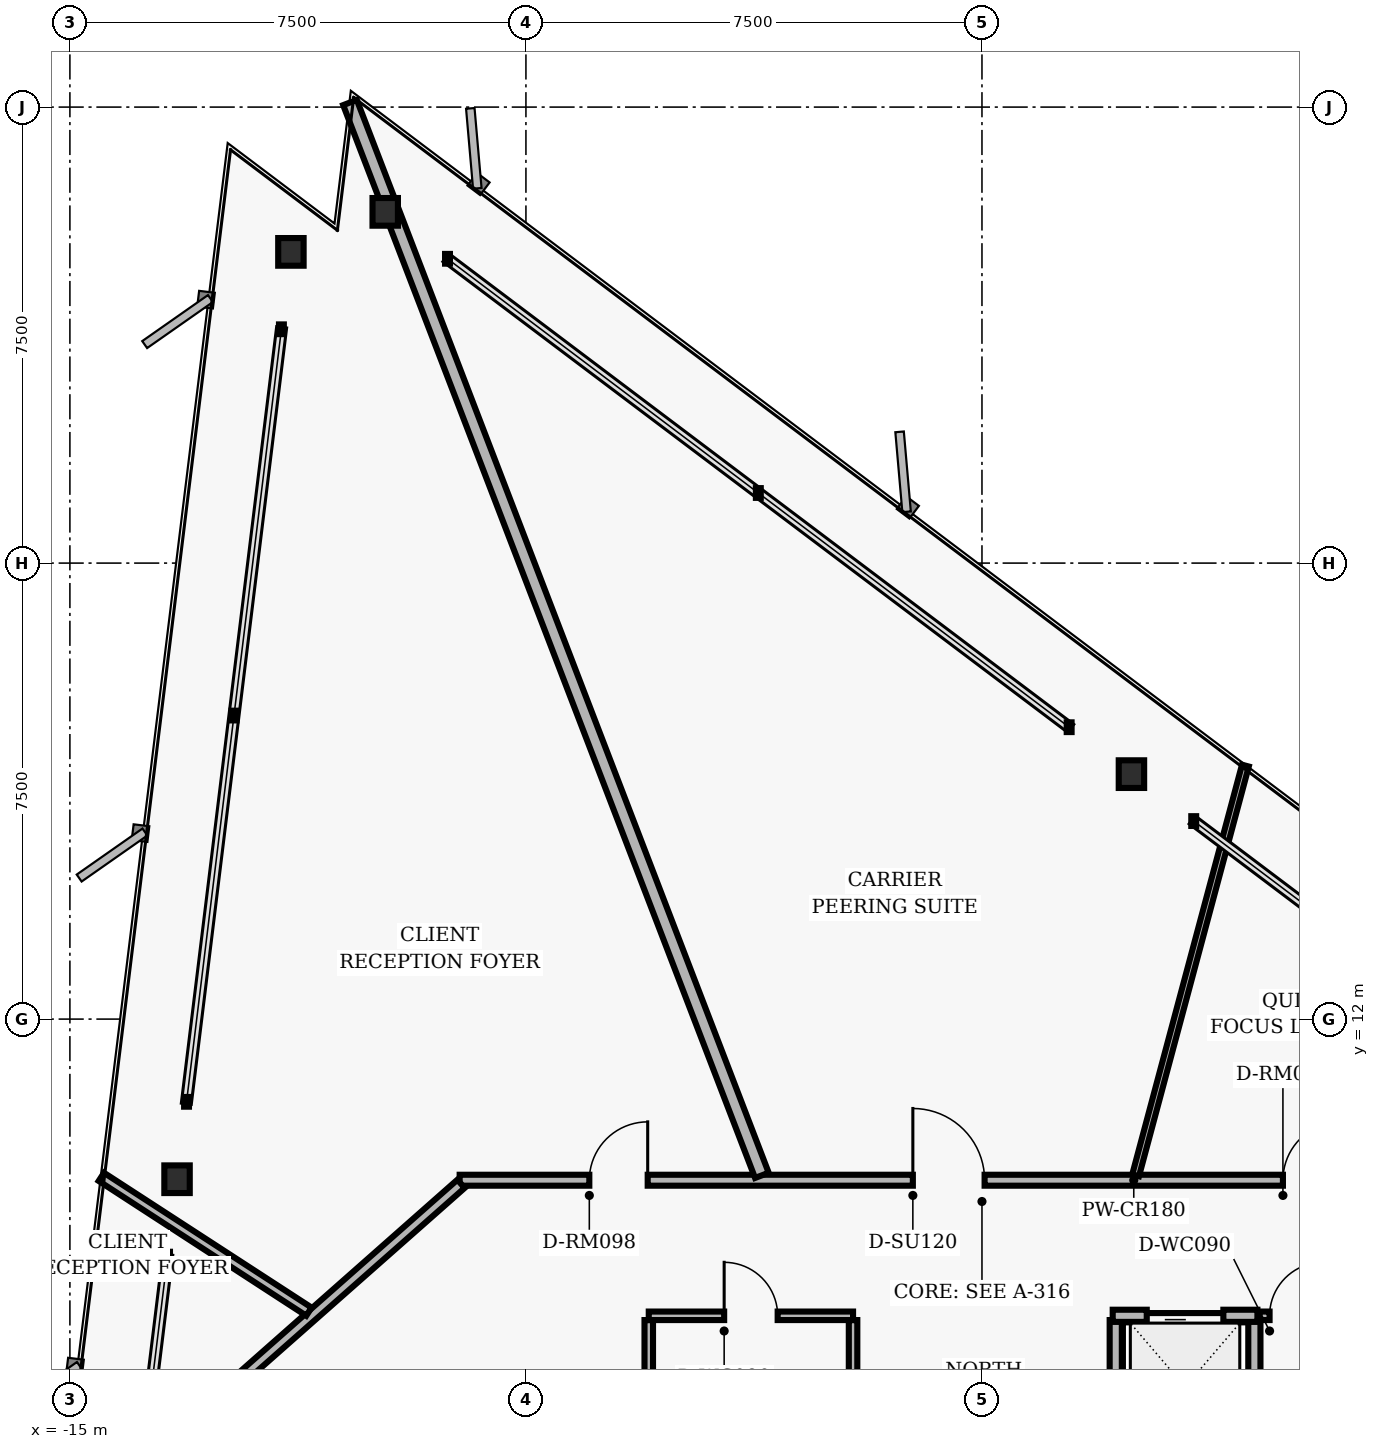
"""IFC4 building model, lengths in metres.
Left out: names, types, materials, properties, quantities, classifications, styles, units other than length and angle.
Written with IfcOpenShell. Run it as: python <this file> out.ifc"""

import sys

from ifc_helpers import new_model, si_unit, direction, frame, frame_2d, origin, origin_2d, place, context, subcontext, project, spatial, rectangle, i_section, extrude, element, fill, save


model = new_model("IFC4")
c1 = context("Model", 3, precision=1e-05, world=origin(), true_north=direction((0.0, 1.0)))
c2 = subcontext(c1, "Body", "Model", "MODEL_VIEW")
j1 = project(units=[si_unit("LENGTHUNIT", "METRE"), si_unit("PLANEANGLEUNIT", "RADIAN")], contexts=[c1])
p1 = place(None, origin())
s1 = spatial("IfcSite", under=j1, at=p1, CompositionType="ELEMENT")
p2 = place(p1, origin())
s2 = spatial("IfcBuilding", under=s1, at=p2, CompositionType="ELEMENT")
p3 = place(p2, frame((0.0, 0.0, 66.4)))
s3 = spatial("IfcBuildingStorey", under=s2, at=p3, CompositionType="ELEMENT", Elevation=66.4)
for number, where, z_axis, x_axis in (
    (1, (2.458, 16.029, 0.0), (0.0, 0.0, 1.0), (1.0, 0.0, 0.0)),
    (2, (-9.814, 25.277, 0.0), (0.0, 0.0, 1.0), (1.0, 0.0, 0.0)),
    (3, (-11.365, 24.619, 0.0), (0.0, 0.0, 1.0), (1.0, 0.0, 0.0)),
    (4, (-13.238, 9.366, 0.0), (0.0, 0.0, 1.0), (1.0, 0.0, 0.0)),
):
    element("IfcColumn", number, at=place(p3, frame(where, z_axis=z_axis, x_axis=x_axis)), inside=s3, PredefinedType="COLUMN", context=c2, shape_type="SweptSolid", body=[
        extrude(i_section(OverallWidth=0.418, OverallDepth=0.455, WebThickness=0.042, FlangeThickness=0.068, FilletRadius=0.025, at=origin_2d()), origin(), (0.0, 0.0, 1.0), 3.36),
    ])
for number, where, z_axis, x_axis in (
    (5, (2.2, 4.95, 0.0), (0.0, 0.0, 1.0), (0.0, 1.0, 0.0)),
    (6, (4.48, 4.95, 0.0), (0.0, 0.0, 1.0), (0.0, 1.0, 0.0)),
):
    element("IfcWall", number, at=place(p3, frame(where, z_axis=z_axis, x_axis=x_axis)), inside=s3, PredefinedType="PARTITIONING", context=c2, shape_type="SweptSolid", body=[
        extrude(rectangle(XDim=2.1, YDim=0.2, at=frame_2d((1.05, 0.0))), origin(), (0.0, 0.0, 1.0), 3.073),
    ])
p4 = place(p3, frame((2.15, 7.12, 0.0), z_axis=(0.0, 0.0, 1.0), x_axis=(1.0, 0.0, 0.0)))
e7 = element("IfcWall", 7, at=p4, inside=s3, PredefinedType="PARTITIONING", context=c2, shape_type="SweptSolid", body=[
    extrude(rectangle(XDim=2.38, YDim=0.2, at=frame_2d((1.19, 0.0))), origin(), (0.0, 0.0, 1.0), 2.587),
])
p5 = place(p4, frame((0.56, 0.0, 0.0)))
e8 = element("IfcOpeningElement", 8, at=p5, cuts=e7, PredefinedType="OPENING", context=c2, shape_type="SweptSolid", body=[
    extrude(rectangle(XDim=1.26, YDim=2.06, at=frame_2d((0.63, 1.03))), frame((0.0, 0.11, 0.0), z_axis=(0.0, -1.0, 0.0), x_axis=(1.0, 0.0, 0.0)), (0.0, 0.0, 1.0), 0.22),
])
for number, where, z_axis, x_axis in (
    (9, (-5.48, 4.95, 0.0), (0.0, 0.0, 1.0), (0.0, 1.0, 0.0)),
    (10, (-2.12, 4.95, 0.0), (0.0, 0.0, 1.0), (0.0, 1.0, 0.0)),
):
    element("IfcWall", number, at=place(p3, frame(where, z_axis=z_axis, x_axis=x_axis)), inside=s3, PredefinedType="PARTITIONING", context=c2, shape_type="SweptSolid", body=[
        extrude(rectangle(XDim=2.1, YDim=0.14, at=frame_2d((1.05, 0.0))), origin(), (0.0, 0.0, 1.0), 3.073),
    ])
p6 = place(p3, frame((-5.48, 7.12, 0.0), z_axis=(0.0, 0.0, 1.0), x_axis=(1.0, 0.0, 0.0)))
e11 = element("IfcWall", 11, at=p6, inside=s3, PredefinedType="PARTITIONING", context=c2, shape_type="SweptSolid", body=[
    extrude(rectangle(XDim=3.36, YDim=0.14, at=frame_2d((1.68, 0.0))), origin(), (0.0, 0.0, 1.0), 3.073),
])
p7 = place(p6, frame((1.24, 0.0, 0.0)))
e12 = element("IfcOpeningElement", 12, at=p7, cuts=e11, PredefinedType="OPENING", context=c2, shape_type="SweptSolid", body=[
    extrude(rectangle(XDim=0.88, YDim=2.02, at=frame_2d((0.44, 1.01))), frame((0.0, 0.08, 0.0), z_axis=(0.0, -1.0, 0.0), x_axis=(1.0, 0.0, 0.0)), (0.0, 0.0, 1.0), 0.16),
])
p8 = place(p3, frame((4.56, 7.12, 0.0), z_axis=(0.0, 0.0, 1.0), x_axis=(1.0, 0.0, 0.0)))
e13 = element("IfcWall", 13, at=p8, inside=s3, PredefinedType="PARTITIONING", context=c2, shape_type="SweptSolid", body=[
    extrude(rectangle(XDim=1.22, YDim=0.14, at=frame_2d((0.61, 0.0))), origin(), (0.0, 0.0, 1.0), 2.587),
])
p9 = place(p8, frame((0.17, 0.0, 0.0)))
e14 = element("IfcOpeningElement", 14, at=p9, cuts=e13, PredefinedType="OPENING", context=c2, shape_type="SweptSolid", body=[
    extrude(rectangle(XDim=0.88, YDim=2.02, at=frame_2d((0.44, 1.01))), frame((0.0, 0.08, 0.0), z_axis=(0.0, -1.0, 0.0), x_axis=(1.0, 0.0, 0.0)), (0.0, 0.0, 1.0), 0.16),
])
p10 = place(p3, frame((-8.59, 9.35, 0.0), z_axis=(0.0, 0.0, 1.0), x_axis=(1.0, 0.0, 0.0)))
e15 = element("IfcWall", 15, at=p10, inside=s3, PredefinedType="PARTITIONING", context=c2, shape_type="SweptSolid", body=[
    extrude(rectangle(XDim=17.18, YDim=0.18, at=frame_2d((8.59, 0.0))), origin(), (0.0, 0.0, 1.0), 3.073),
])
p11 = place(p10, frame((13.54, 0.0, 0.0)))
e16 = element("IfcOpeningElement", 16, at=p11, cuts=e15, PredefinedType="OPENING", context=c2, shape_type="SweptSolid", body=[
    extrude(rectangle(XDim=0.96, YDim=2.02, at=frame_2d((0.48, 1.01))), frame((0.0, 0.1, 0.0), z_axis=(0.0, -1.0, 0.0), x_axis=(1.0, 0.0, 0.0)), (0.0, 0.0, 1.0), 0.2),
])
p12 = place(p10, frame((7.453, 0.0, 0.0)))
e17 = element("IfcOpeningElement", 17, at=p12, cuts=e15, PredefinedType="OPENING", context=c2, shape_type="SweptSolid", body=[
    extrude(rectangle(XDim=1.18, YDim=2.02, at=frame_2d((0.59, 1.01))), frame((0.0, 0.1, 0.0), z_axis=(0.0, -1.0, 0.0), x_axis=(1.0, 0.0, 0.0)), (0.0, 0.0, 1.0), 0.2),
])
p13 = place(p10, frame((2.133, 0.0, 0.0)))
e18 = element("IfcOpeningElement", 18, at=p13, cuts=e15, PredefinedType="OPENING", context=c2, shape_type="SweptSolid", body=[
    extrude(rectangle(XDim=0.96, YDim=2.02, at=frame_2d((0.48, 1.01))), frame((0.0, 0.1, 0.0), z_axis=(0.0, -1.0, 0.0), x_axis=(1.0, 0.0, 0.0)), (0.0, 0.0, 1.0), 0.2),
])
p14 = place(p3, frame((-13.268, 5.14, 0.0), z_axis=(0.0, 0.0, 1.0), x_axis=(0.749626463267, 0.66186113768, 0.0)))
e19 = element("IfcWall", 19, at=p14, inside=s3, PredefinedType="PARTITIONING", context=c2, shape_type="SweptSolid", body=[
    extrude(rectangle(XDim=6.27, YDim=0.18, at=frame_2d((3.135, 0.0))), origin(), (0.0, 0.0, 1.0), 3.073),
])
p15 = place(p3, frame((2.527, 9.43, 0.0), z_axis=(0.0, 0.0, 1.0), x_axis=(0.258803716415, 0.965929933468, 0.0)))
e20 = element("IfcWall", 20, at=p15, inside=s3, PredefinedType="MOVABLE", context=c2, shape_type="SweptSolid", body=[
    extrude(rectangle(XDim=6.977, YDim=0.115, at=frame_2d((3.489, 0.0))), origin(), (0.0, 0.0, 1.0), 3.073),
])
p16 = place(p3, frame((-3.62, 9.43, 0.0), z_axis=(0.0, 0.0, 1.0), x_axis=(-0.358366182081, 0.933581104961, 0.0)))
e21 = element("IfcWall", 21, at=p16, inside=s3, PredefinedType="PARTITIONING", context=c2, shape_type="SweptSolid", body=[
    extrude(rectangle(XDim=18.901, YDim=0.24, at=frame_2d((9.45, 0.0))), origin(), (0.0, 0.0, 1.0), 3.073),
])
p17 = place(p3, frame((-11.069, 7.188, 0.0), z_axis=(0.0, 0.0, 1.0), x_axis=(-0.838653238926, 0.544665718436, 0.0)))
e22 = element("IfcWall", 22, at=p17, inside=s3, PredefinedType="PARTITIONING", context=c2, shape_type="SweptSolid", body=[
    extrude(rectangle(XDim=4.07, YDim=0.16, at=frame_2d((2.035, 0.0))), origin(), (0.0, 0.0, 1.0), 2.358),
])
p18 = place(p5, origin())
e23 = element("IfcDoor", 23, at=p18, inside=s3, OperationType="SLIDING_TO_LEFT", PredefinedType="DOOR", context=c2, shape_type="SweptSolid", body=[
    extrude(rectangle(XDim=1.26, YDim=2.06, at=frame_2d((0.63, 1.03))), frame((0.0, 0.025, 0.0), z_axis=(0.0, -1.0, 0.0), x_axis=(1.0, 0.0, 0.0)), (0.0, 0.0, 1.0), 0.05),
])
fill(e8, e23)
p19 = place(p7, origin())
e24 = element("IfcDoor", 24, at=p19, inside=s3, OperationType="SINGLE_SWING_LEFT", PredefinedType="DOOR", context=c2, shape_type="SweptSolid", body=[
    extrude(rectangle(XDim=0.88, YDim=2.02, at=frame_2d((0.44, 1.01))), frame((0.0, 0.025, 0.0), z_axis=(0.0, -1.0, 0.0), x_axis=(1.0, 0.0, 0.0)), (0.0, 0.0, 1.0), 0.05),
])
fill(e12, e24)
p20 = place(p9, origin())
e25 = element("IfcDoor", 25, at=p20, inside=s3, OperationType="SINGLE_SWING_RIGHT", PredefinedType="DOOR", context=c2, shape_type="SweptSolid", body=[
    extrude(rectangle(XDim=0.88, YDim=2.02, at=frame_2d((0.44, 1.01))), frame((0.0, 0.025, 0.0), z_axis=(0.0, -1.0, 0.0), x_axis=(1.0, 0.0, 0.0)), (0.0, 0.0, 1.0), 0.05),
])
fill(e14, e25)
p21 = place(p11, origin())
e26 = element("IfcDoor", 26, at=p21, inside=s3, OperationType="SINGLE_SWING_RIGHT", PredefinedType="DOOR", context=c2, shape_type="SweptSolid", body=[
    extrude(rectangle(XDim=0.96, YDim=2.02, at=frame_2d((0.48, 1.01))), frame((0.0, 0.025, 0.0), z_axis=(0.0, -1.0, 0.0), x_axis=(1.0, 0.0, 0.0)), (0.0, 0.0, 1.0), 0.05),
])
fill(e16, e26)
p22 = place(p12, origin())
e27 = element("IfcDoor", 27, at=p22, inside=s3, OperationType="SINGLE_SWING_LEFT", PredefinedType="DOOR", context=c2, shape_type="SweptSolid", body=[
    extrude(rectangle(XDim=1.18, YDim=2.02, at=frame_2d((0.59, 1.01))), frame((0.0, 0.025, 0.0), z_axis=(0.0, -1.0, 0.0), x_axis=(1.0, 0.0, 0.0)), (0.0, 0.0, 1.0), 0.05),
])
fill(e17, e27)
p23 = place(p13, origin())
e28 = element("IfcDoor", 28, at=p23, inside=s3, OperationType="SINGLE_SWING_RIGHT", PredefinedType="DOOR", context=c2, shape_type="SweptSolid", body=[
    extrude(rectangle(XDim=0.96, YDim=2.02, at=frame_2d((0.48, 1.01))), frame((0.0, 0.025, 0.0), z_axis=(0.0, -1.0, 0.0), x_axis=(1.0, 0.0, 0.0)), (0.0, 0.0, 1.0), 0.05),
])
fill(e18, e28)
save(model, sys.argv[1])
